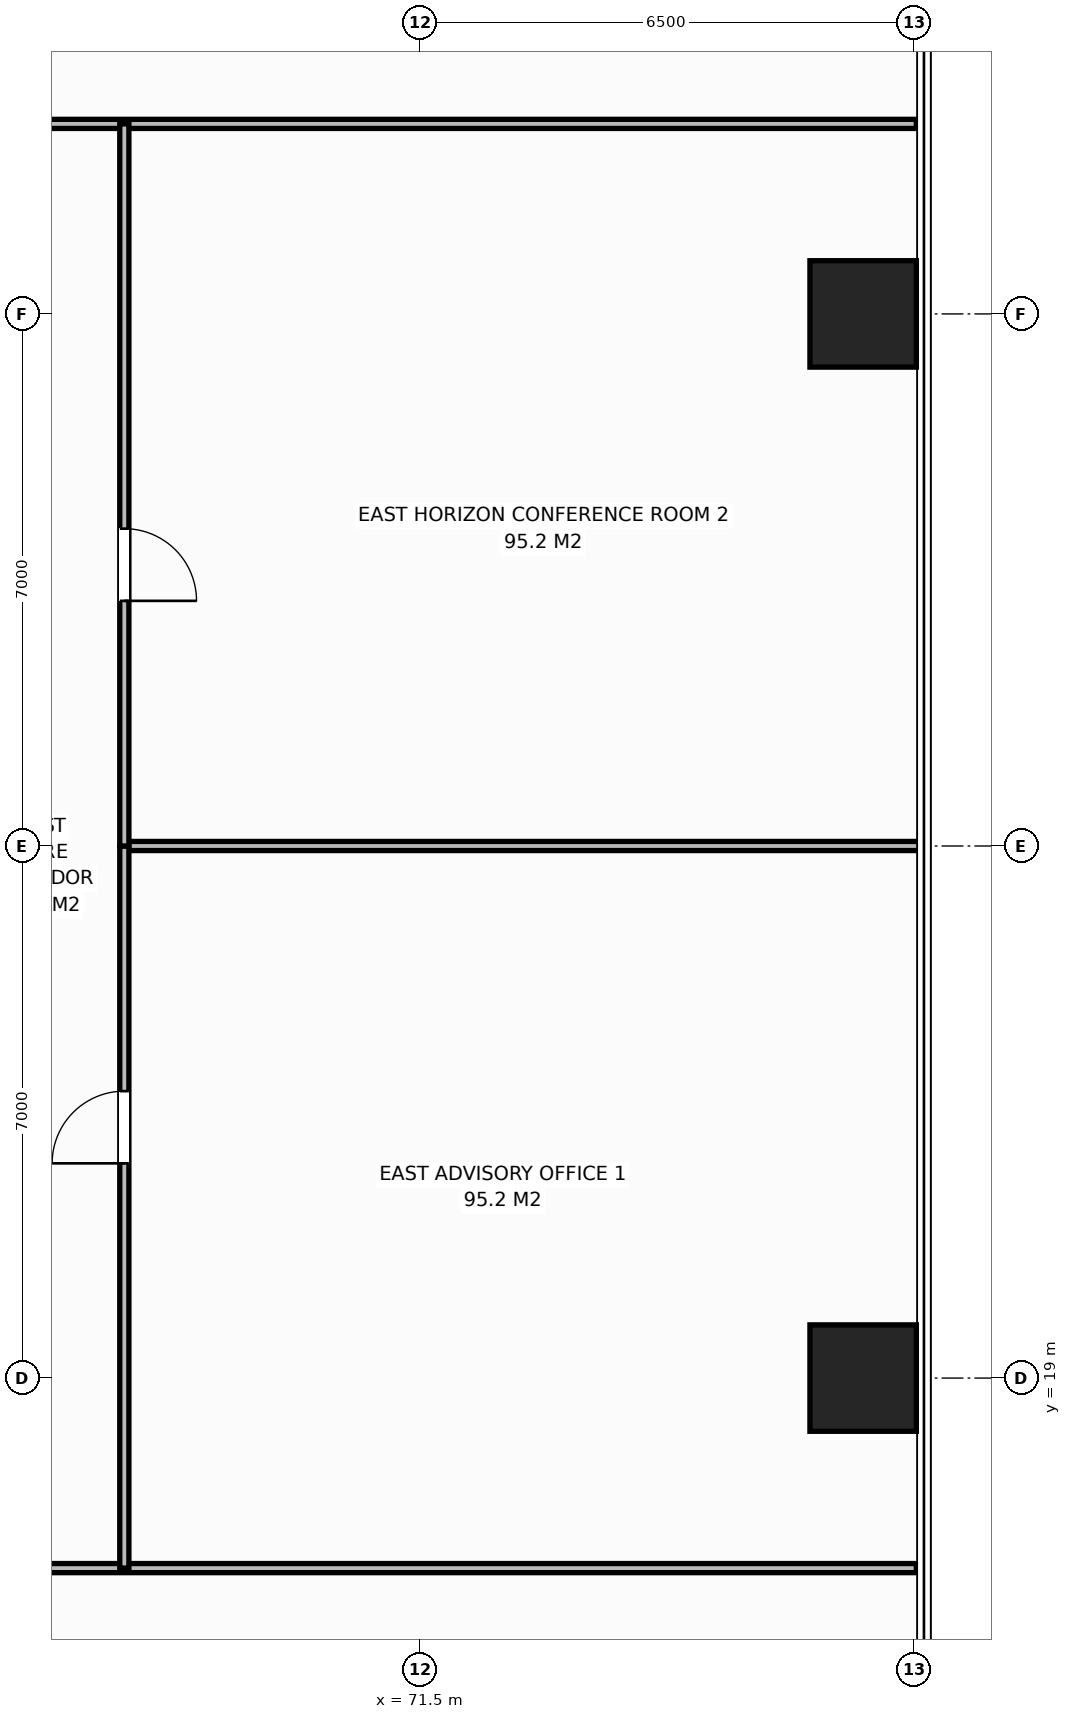
"""IFC4 building model, lengths in metres.
Left out: names, types, materials, properties, quantities, classifications, styles, units other than length and angle.
Written with IfcOpenShell. Run it as: python <this file> out.ifc"""

import sys

from ifc_helpers import new_model, si_unit, direction, frame, frame_2d, origin, origin_2d, place, context, subcontext, project, spatial, rectangle, extrude, element, fill, save


model = new_model("IFC4")
c1 = context("Model", 3, precision=1e-05, world=origin(), true_north=direction((0.0, 1.0)))
c2 = subcontext(c1, "Body", "Model", "MODEL_VIEW")
j1 = project(units=[si_unit("LENGTHUNIT", "METRE"), si_unit("PLANEANGLEUNIT", "RADIAN")], contexts=[c1])
p1 = place(None, origin())
s1 = spatial("IfcSite", under=j1, at=p1, CompositionType="ELEMENT")
p2 = place(p1, origin())
s2 = spatial("IfcBuilding", under=s1, at=p2, CompositionType="ELEMENT")
p3 = place(p2, frame((0.0, 0.0, 27.8)))
s3 = spatial("IfcBuildingStorey", under=s2, at=p3, CompositionType="ELEMENT", Elevation=27.8)
for number, where, z_axis, x_axis in (
    (1, (77.32, 19.0, 0.0), (0.0, 0.0, 1.0), (1.0, 0.0, 0.0)),
    (2, (77.32, 33.0, 0.0), (0.0, 0.0, 1.0), (1.0, 0.0, 0.0)),
):
    element("IfcColumn", number, at=place(p3, frame(where, z_axis=z_axis, x_axis=x_axis)), inside=s3, PredefinedType="COLUMN", context=c2, shape_type="SweptSolid", body=[
        extrude(rectangle(XDim=1.4, YDim=1.4, at=origin_2d()), origin(), (0.0, 0.0, 1.0), 3.8),
    ])
p4 = place(p3, frame((32.46, 35.5, 0.0), z_axis=(0.0, 0.0, 1.0), x_axis=(1.0, 0.0, 0.0)))
e3 = element("IfcWall", 3, at=p4, inside=s3, PredefinedType="PARTITIONING", context=c2, shape_type="SweptSolid", body=[
    extrude(rectangle(XDim=45.56, YDim=0.12, at=frame_2d((22.78, 0.0))), origin(), (0.0, 0.0, 1.0), 3.55),
])
p5 = place(p4, frame((17.095, 0.0, 0.0)))
e4 = element("IfcOpeningElement", 4, at=p5, cuts=e3, PredefinedType="OPENING", context=c2, shape_type="SweptSolid", body=[
    extrude(rectangle(XDim=0.95, YDim=2.15, at=frame_2d((0.475, 1.075))), frame((0.0, 0.07, 0.0), z_axis=(0.0, -1.0, 0.0), x_axis=(1.0, 0.0, 0.0)), (0.0, 0.0, 1.0), 0.14),
])
p6 = place(p3, frame((40.043, 16.5, 0.0), z_axis=(0.0, 0.0, 1.0), x_axis=(1.0, 0.0, 0.0)))
e5 = element("IfcWall", 5, at=p6, inside=s3, PredefinedType="PARTITIONING", context=c2, shape_type="SweptSolid", body=[
    extrude(rectangle(XDim=37.977, YDim=0.12, at=frame_2d((18.988, 0.0))), origin(), (0.0, 0.0, 1.0), 3.55),
])
p7 = place(p6, frame((13.303, 0.0, 0.0)))
e6 = element("IfcOpeningElement", 6, at=p7, cuts=e5, PredefinedType="OPENING", context=c2, shape_type="SweptSolid", body=[
    extrude(rectangle(XDim=0.95, YDim=2.15, at=frame_2d((0.475, 1.075))), frame((0.0, 0.07, 0.0), z_axis=(0.0, -1.0, 0.0), x_axis=(1.0, 0.0, 0.0)), (0.0, 0.0, 1.0), 0.14),
])
p8 = place(p3, frame((67.6, 26.0, 0.0), z_axis=(0.0, 0.0, 1.0), x_axis=(1.0, 0.0, 0.0)))
e7 = element("IfcWall", 7, at=p8, inside=s3, PredefinedType="PARTITIONING", context=c2, shape_type="SweptSolid", body=[
    extrude(rectangle(XDim=10.58, YDim=0.12, at=frame_2d((5.29, 0.0))), origin(), (0.0, 0.0, 1.0), 3.55),
])
p9 = place(p3, frame((67.6, 16.5, 0.0), z_axis=(0.0, 0.0, 1.0), x_axis=(0.0, 1.0, 0.0)))
e8 = element("IfcWall", 8, at=p9, inside=s3, PredefinedType="PARTITIONING", context=c2, shape_type="SweptSolid", body=[
    extrude(rectangle(XDim=9.5, YDim=0.12, at=frame_2d((4.75, 0.0))), origin(), (0.0, 0.0, 1.0), 3.55),
])
p10 = place(p9, frame((5.325, 0.0, 0.0)))
e9 = element("IfcOpeningElement", 9, at=p10, cuts=e8, PredefinedType="OPENING", context=c2, shape_type="SweptSolid", body=[
    extrude(rectangle(XDim=0.95, YDim=2.15, at=frame_2d((0.475, 1.075))), frame((0.0, 0.07, 0.0), z_axis=(0.0, -1.0, 0.0), x_axis=(1.0, 0.0, 0.0)), (0.0, 0.0, 1.0), 0.14),
])
p11 = place(p3, frame((67.6, 26.0, 0.0), z_axis=(0.0, 0.0, 1.0), x_axis=(0.0, 1.0, 0.0)))
e10 = element("IfcWall", 10, at=p11, inside=s3, PredefinedType="PARTITIONING", context=c2, shape_type="SweptSolid", body=[
    extrude(rectangle(XDim=9.5, YDim=0.12, at=frame_2d((4.75, 0.0))), origin(), (0.0, 0.0, 1.0), 3.55),
])
p12 = place(p11, frame((3.225, 0.0, 0.0)))
e11 = element("IfcOpeningElement", 11, at=p12, cuts=e10, PredefinedType="OPENING", context=c2, shape_type="SweptSolid", body=[
    extrude(rectangle(XDim=0.95, YDim=2.15, at=frame_2d((0.475, 1.075))), frame((0.0, 0.07, 0.0), z_axis=(0.0, -1.0, 0.0), x_axis=(1.0, 0.0, 0.0)), (0.0, 0.0, 1.0), 0.14),
])
p13 = place(p10, origin())
e12 = element("IfcDoor", 12, at=p13, inside=s3, OperationType="SINGLE_SWING_LEFT", PredefinedType="DOOR", context=c2, shape_type="SweptSolid", body=[
    extrude(rectangle(XDim=0.95, YDim=2.15, at=frame_2d((0.475, 1.075))), frame((0.0, 0.025, 0.0), z_axis=(0.0, -1.0, 0.0), x_axis=(1.0, 0.0, 0.0)), (0.0, 0.0, 1.0), 0.05),
])
fill(e9, e12)
p14 = place(p12, origin())
e13 = element("IfcDoor", 13, at=p14, inside=s3, OperationType="SINGLE_SWING_RIGHT", PredefinedType="DOOR", context=c2, shape_type="SweptSolid", body=[
    extrude(rectangle(XDim=0.95, YDim=2.15, at=frame_2d((0.475, 1.075))), frame((0.0, 0.025, 0.0), z_axis=(0.0, -1.0, 0.0), x_axis=(1.0, 0.0, 0.0)), (0.0, 0.0, 1.0), 0.05),
])
fill(e11, e13)
save(model, sys.argv[1])
